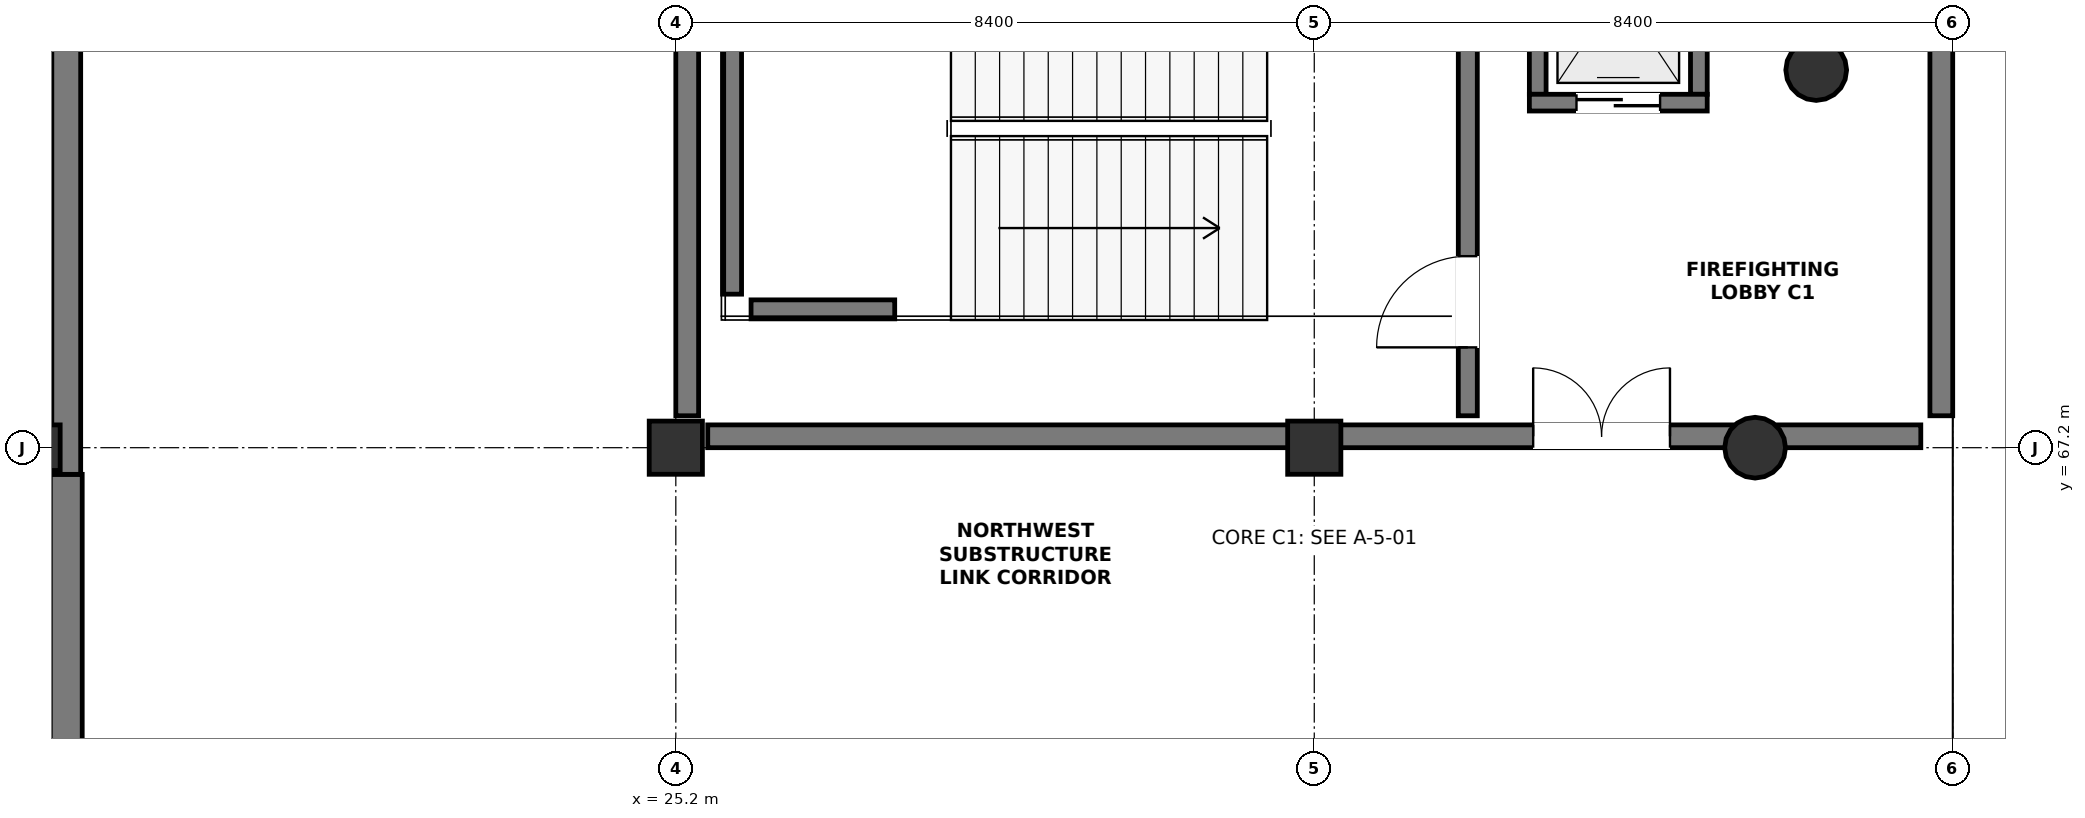
"""IFC4 building model, lengths in metres.
Left out: names, types, materials, properties, quantities, classifications, styles, units other than length and angle.
Written with IfcOpenShell. Run it as: python <this file> out.ifc"""

import sys

from ifc_helpers import new_model, si_unit, direction, frame, frame_2d, origin, origin_2d, place, context, subcontext, project, spatial, rectangle, circle, extrude, element, fill, save


model = new_model("IFC4")
c1 = context("Model", 3, precision=1e-05, world=origin(), true_north=direction((0.0, 1.0)))
c2 = subcontext(c1, "Body", "Model", "MODEL_VIEW")
j1 = project(units=[si_unit("LENGTHUNIT", "METRE"), si_unit("PLANEANGLEUNIT", "RADIAN")], contexts=[c1])
p1 = place(None, origin())
s1 = spatial("IfcSite", under=j1, at=p1, CompositionType="ELEMENT")
p2 = place(p1, origin())
s2 = spatial("IfcBuilding", under=s1, at=p2, CompositionType="ELEMENT")
p3 = place(p2, frame((0.0, 0.0, -4.8)))
s3 = spatial("IfcBuildingStorey", under=s2, at=p3, CompositionType="ELEMENT", Elevation=-4.8)
for number, where, z_axis, x_axis in (
    (1, (40.204, 72.169, 0.0), (0.0, 0.0, 1.0), (1.0, 0.0, 0.0)),
    (2, (39.4, 67.2, 0.0), (0.0, 0.0, 1.0), (1.0, 0.0, 0.0)),
):
    element("IfcColumn", number, at=place(p3, frame(where, z_axis=z_axis, x_axis=x_axis)), inside=s3, PredefinedType="COLUMN", context=c2, shape_type="SweptSolid", body=[
        extrude(circle(Radius=0.4, at=origin_2d()), origin(), (0.0, 0.0, 1.0), 4.8),
    ])
p4 = place(p3, frame((16.8, 67.2, 0.0), z_axis=(0.0, 0.0, 1.0), x_axis=(1.0, 0.0, 0.0)))
e3 = element("IfcColumn", 3, at=p4, inside=s3, PredefinedType="COLUMN", context=c2, shape_type="SweptSolid", body=[
    extrude(rectangle(XDim=0.6, YDim=0.6, at=origin_2d()), origin(), (0.0, 0.0, 1.0), 4.8),
])
for number, where, z_axis, x_axis in (
    (4, (25.2, 67.2, 0.0), (0.0, 0.0, 1.0), (1.0, 0.0, 0.0)),
    (5, (33.6, 67.2, 0.0), (0.0, 0.0, 1.0), (1.0, 0.0, 0.0)),
):
    element("IfcColumn", number, at=place(p3, frame(where, z_axis=z_axis, x_axis=x_axis)), inside=s3, PredefinedType="COLUMN", context=c2, shape_type="SweptSolid", body=[
        extrude(rectangle(XDim=0.7, YDim=0.7, at=origin_2d()), origin(), (0.0, 0.0, 1.0), 4.8),
    ])
p5 = place(p3, frame((17.18, 59.18, 0.0), z_axis=(0.0, 0.0, 1.0), x_axis=(0.0, 1.0, 0.0)))
e6 = element("IfcWall", 6, at=p5, inside=s3, PredefinedType="USERDEFINED", context=c2, shape_type="SweptSolid", body=[
    extrude(rectangle(XDim=7.669, YDim=0.42, at=frame_2d((3.834, 0.0))), origin(), (0.0, 0.0, 1.0), 3.75),
])
p6 = place(p3, frame((17.18, 66.849, 0.0), z_axis=(0.0, 0.0, 1.0), x_axis=(0.0, 1.0, 0.0)))
e7 = element("IfcWall", 7, at=p6, inside=s3, PredefinedType="USERDEFINED", context=c2, shape_type="SweptSolid", body=[
    extrude(rectangle(XDim=7.669, YDim=0.38, at=frame_2d((3.834, 0.0))), origin(), (0.0, 0.0, 1.0), 3.75),
])
p7 = place(p3, frame((25.62, 67.35, 0.0), z_axis=(0.0, 0.0, 1.0), x_axis=(1.0, 0.0, 0.0)))
e8 = element("IfcWall", 8, at=p7, inside=s3, PredefinedType="SHEAR", context=c2, shape_type="SweptSolid", body=[
    extrude(rectangle(XDim=15.96, YDim=0.3, at=frame_2d((7.98, 0.0))), origin(), (0.0, 0.0, 1.0), 4.5),
])
p8 = place(p7, frame((10.86, 0.0, 0.0)))
e9 = element("IfcOpeningElement", 9, at=p8, cuts=e8, PredefinedType="OPENING", context=c2, shape_type="SweptSolid", body=[
    extrude(rectangle(XDim=1.8, YDim=2.2, at=frame_2d((0.9, 1.1))), frame((0.0, 0.162, 0.0), z_axis=(0.0, -1.0, 0.0), x_axis=(1.0, 0.0, 0.0)), (0.0, 0.0, 1.0), 0.324),
])
for number, where, z_axis, x_axis in (
    (10, (25.35, 67.62, 0.0), (0.0, 0.0, 1.0), (0.0, 1.0, 0.0)),
    (11, (41.85, 67.62, 0.0), (0.0, 0.0, 1.0), (0.0, 1.0, 0.0)),
):
    element("IfcWall", number, at=place(p3, frame(where, z_axis=z_axis, x_axis=x_axis)), inside=s3, PredefinedType="SHEAR", context=c2, shape_type="SweptSolid", body=[
        extrude(rectangle(XDim=7.56, YDim=0.3, at=frame_2d((3.78, 0.0))), origin(), (0.0, 0.0, 1.0), 4.5),
    ])
p9 = place(p3, frame((25.94, 69.22, 0.0), z_axis=(0.0, 0.0, 1.0), x_axis=(0.0, 1.0, 0.0)))
e12 = element("IfcWall", 12, at=p9, inside=s3, PredefinedType="SHEAR", context=c2, shape_type="SweptSolid", body=[
    extrude(rectangle(XDim=4.36, YDim=0.25, at=frame_2d((2.18, 0.0))), origin(), (0.0, 0.0, 1.0), 4.5),
])
p10 = place(p3, frame((26.19, 69.02, 0.0), z_axis=(0.0, 0.0, 1.0), x_axis=(1.0, 0.0, 0.0)))
e13 = element("IfcWall", 13, at=p10, inside=s3, PredefinedType="SHEAR", context=c2, shape_type="SweptSolid", body=[
    extrude(rectangle(XDim=1.89, YDim=0.25, at=frame_2d((0.945, 0.0))), origin(), (0.0, 0.0, 1.0), 4.5),
])
p11 = place(p3, frame((35.62, 67.62, 0.0), z_axis=(0.0, 0.0, 1.0), x_axis=(0.0, 1.0, 0.0)))
e14 = element("IfcWall", 14, at=p11, inside=s3, PredefinedType="SHEAR", context=c2, shape_type="SweptSolid", body=[
    extrude(rectangle(XDim=7.56, YDim=0.25, at=frame_2d((3.78, 0.0))), origin(), (0.0, 0.0, 1.0), 4.5),
])
p12 = place(p11, frame((0.9, 0.0, 0.0)))
e15 = element("IfcOpeningElement", 15, at=p12, cuts=e14, PredefinedType="OPENING", context=c2, shape_type="SweptSolid", body=[
    extrude(rectangle(XDim=1.2, YDim=2.2, at=frame_2d((0.6, 1.1))), frame((0.0, 0.137, 0.0), z_axis=(0.0, -1.0, 0.0), x_axis=(1.0, 0.0, 0.0)), (0.0, 0.0, 1.0), 0.274),
])
for number, where, z_axis, x_axis in (
    (16, (36.54, 71.85, 0.0), (0.0, 0.0, 1.0), (0.0, 1.0, 0.0)),
    (17, (38.66, 71.85, 0.0), (0.0, 0.0, 1.0), (0.0, 1.0, 0.0)),
):
    element("IfcWall", number, at=place(p3, frame(where, z_axis=z_axis, x_axis=x_axis)), inside=s3, PredefinedType="SOLIDWALL", context=c2, shape_type="SweptSolid", body=[
        extrude(rectangle(XDim=2.7, YDim=0.22, at=frame_2d((1.35, 0.0))), origin(), (0.0, 0.0, 1.0), 4.5),
    ])
p13 = place(p3, frame((36.43, 71.74, 0.0), z_axis=(0.0, 0.0, 1.0), x_axis=(1.0, 0.0, 0.0)))
e18 = element("IfcWall", 18, at=p13, inside=s3, PredefinedType="SOLIDWALL", context=c2, shape_type="SweptSolid", body=[
    extrude(rectangle(XDim=2.34, YDim=0.22, at=frame_2d((1.17, 0.0))), origin(), (0.0, 0.0, 1.0), 4.5),
])
p14 = place(p13, frame((0.62, 0.0, 0.0)))
e19 = element("IfcOpeningElement", 19, at=p14, cuts=e18, PredefinedType="OPENING", context=c2, shape_type="SweptSolid", body=[
    extrude(rectangle(XDim=1.1, YDim=2.15, at=frame_2d((0.55, 1.075))), frame((0.0, 0.122, 0.0), z_axis=(0.0, -1.0, 0.0), x_axis=(1.0, 0.0, 0.0)), (0.0, 0.0, 1.0), 0.244),
])
p15 = place(p8, origin())
e20 = element("IfcDoor", 20, at=p15, inside=s3, OperationType="DOUBLE_DOOR_SINGLE_SWING", PredefinedType="DOOR", context=c2, shape_type="SweptSolid", body=[
    extrude(rectangle(XDim=1.8, YDim=2.2, at=frame_2d((0.9, 1.1))), frame((0.0, 0.025, 0.0), z_axis=(0.0, -1.0, 0.0), x_axis=(1.0, 0.0, 0.0)), (0.0, 0.0, 1.0), 0.05),
])
fill(e9, e20)
p16 = place(p12, origin())
e21 = element("IfcDoor", 21, at=p16, inside=s3, OperationType="SINGLE_SWING_LEFT", PredefinedType="DOOR", context=c2, shape_type="SweptSolid", body=[
    extrude(rectangle(XDim=1.2, YDim=2.2, at=frame_2d((0.6, 1.1))), frame((0.0, 0.025, 0.0), z_axis=(0.0, -1.0, 0.0), x_axis=(1.0, 0.0, 0.0)), (0.0, 0.0, 1.0), 0.05),
])
fill(e15, e21)
p17 = place(p14, origin())
e22 = element("IfcDoor", 22, at=p17, inside=s3, OperationType="DOUBLE_DOOR_SLIDING", PredefinedType="DOOR", context=c2, shape_type="SweptSolid", body=[
    extrude(rectangle(XDim=1.1, YDim=2.15, at=frame_2d((0.55, 1.075))), frame((0.0, 0.025, 0.0), z_axis=(0.0, -1.0, 0.0), x_axis=(1.0, 0.0, 0.0)), (0.0, 0.0, 1.0), 0.05),
])
fill(e19, e22)
save(model, sys.argv[1])
